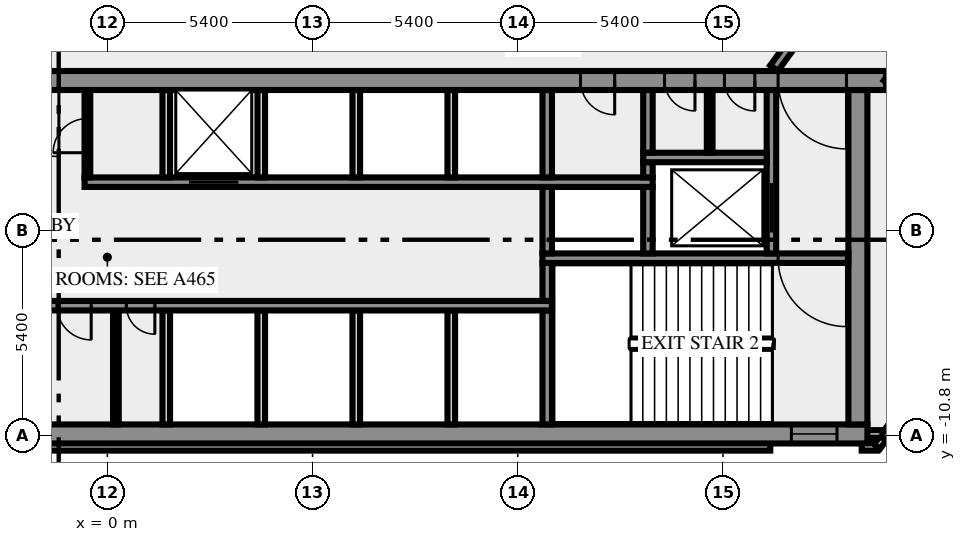
"""IFC4 building model, lengths in metres.
Left out: names, types, materials, properties, quantities, classifications, styles, units other than length and angle.
Written with IfcOpenShell. Run it as: python <this file> out.ifc"""

import sys

from ifc_helpers import new_model, si_unit, direction, frame, frame_2d, origin, place, context, subcontext, project, spatial, rectangle, extrude, element, fill, save


model = new_model("IFC4")
c1 = context("Model", 3, precision=1e-05, world=origin(), true_north=direction((0.0, 1.0)))
c2 = subcontext(c1, "Body", "Model", "MODEL_VIEW")
j1 = project(units=[si_unit("LENGTHUNIT", "METRE"), si_unit("PLANEANGLEUNIT", "RADIAN")], contexts=[c1])
p1 = place(None, origin())
s1 = spatial("IfcSite", under=j1, at=p1, CompositionType="ELEMENT")
p2 = place(p1, origin())
s2 = spatial("IfcBuilding", under=s1, at=p2, CompositionType="ELEMENT")
p3 = place(p2, frame((0.0, 0.0, 89.0)))
s3 = spatial("IfcBuildingStorey", under=s2, at=p3, CompositionType="ELEMENT", Elevation=89.0)
p4 = place(p3, frame((-17.444, -11.088, 0.0), z_axis=(0.0, 0.0, 1.0), x_axis=(1.0, 0.0, 0.0)))
e1 = element("IfcWall", 1, at=p4, inside=s3, PredefinedType="SOLIDWALL", context=c2, shape_type="SweptSolid", body=[
    extrude(rectangle(XDim=34.888, YDim=0.2, at=frame_2d((17.444, 0.0))), origin(), (0.0, 0.0, 1.0), 3.65),
])
p5 = place(p3, frame((19.85, -11.088, 0.0), z_axis=(0.0, 0.0, 1.0), x_axis=(1.0, 0.0, 0.0)))
e2 = element("IfcWall", 2, at=p5, inside=s3, PredefinedType="SOLIDWALL", context=c2, shape_type="SweptSolid", body=[
    extrude(rectangle(XDim=0.406, YDim=0.2, at=frame_2d((0.203, 0.0))), origin(), (0.0, 0.0, 1.0), 3.65),
])
p6 = place(p3, frame((20.253, -11.083, 0.0), z_axis=(0.0, 0.0, 1.0), x_axis=(0.587766567315, 0.809030569476, 0.0)))
e3 = element("IfcWall", 3, at=p6, inside=s3, PredefinedType="SOLIDWALL", context=c2, shape_type="SweptSolid", body=[
    extrude(rectangle(XDim=2.688, YDim=0.2, at=frame_2d((1.344, 0.0))), origin(), (0.0, 0.0, 1.0), 3.65),
])
p7 = place(p3, frame((19.98, -10.75, 0.0), z_axis=(0.0, 0.0, 1.0), x_axis=(1.0, 0.0, 0.0)))
e4 = element("IfcWall", 4, at=p7, inside=s3, PredefinedType="SOLIDWALL", context=c2, shape_type="SweptSolid", body=[
    extrude(rectangle(XDim=0.417, YDim=0.2, at=frame_2d((0.208, 0.0))), origin(), (0.0, 0.0, 1.0), 3.65),
])
p8 = place(p3, frame((-20.0, -10.75, 0.0), z_axis=(0.0, 0.0, 1.0), x_axis=(1.0, 0.0, 0.0)))
e5 = element("IfcWall", 5, at=p8, inside=s3, PredefinedType="SHEAR", context=c2, shape_type="SweptSolid", body=[
    extrude(rectangle(XDim=40.0, YDim=0.5, at=frame_2d((20.0, 0.0))), origin(), (0.0, 0.0, 1.0), 3.65),
])
p9 = place(p8, frame((0.8, 0.0, 1.0)))
e6 = element("IfcOpeningElement", 6, at=p9, cuts=e5, PredefinedType="OPENING", context=c2, shape_type="SweptSolid", body=[
    extrude(rectangle(XDim=1.2, YDim=1.2, at=frame_2d((0.6, 0.6))), frame((0.0, 0.26, 0.0), z_axis=(0.0, -1.0, 0.0), x_axis=(1.0, 0.0, 0.0)), (0.0, 0.0, 1.0), 0.52),
])
p10 = place(p8, frame((38.0, 0.0, 1.0)))
e7 = element("IfcOpeningElement", 7, at=p10, cuts=e5, PredefinedType="OPENING", context=c2, shape_type="SweptSolid", body=[
    extrude(rectangle(XDim=1.2, YDim=1.2, at=frame_2d((0.6, 0.6))), frame((0.0, 0.26, 0.0), z_axis=(0.0, -1.0, 0.0), x_axis=(1.0, 0.0, 0.0)), (0.0, 0.0, 1.0), 0.52),
])
p11 = place(p3, frame((0.225, -10.5, 0.0), z_axis=(0.0, 0.0, 1.0), x_axis=(0.0, 1.0, 0.0)))
e8 = element("IfcWall", 8, at=p11, inside=s3, PredefinedType="PARTITIONING", context=c2, shape_type="SweptSolid", body=[
    extrude(rectangle(XDim=3.0, YDim=0.15, at=frame_2d((1.5, 0.0))), origin(), (0.0, 0.0, 1.0), 3.65),
])
for number, where, z_axis, x_axis in (
    (9, (1.55, -10.5, 0.0), (0.0, 0.0, 1.0), (0.0, 1.0, 0.0)),
    (10, (4.05, -10.5, 0.0), (0.0, 0.0, 1.0), (0.0, 1.0, 0.0)),
    (11, (6.55, -10.5, 0.0), (0.0, 0.0, 1.0), (0.0, 1.0, 0.0)),
    (12, (9.05, -10.5, 0.0), (0.0, 0.0, 1.0), (0.0, 1.0, 0.0)),
):
    element("IfcWall", number, at=place(p3, frame(where, z_axis=z_axis, x_axis=x_axis)), inside=s3, PredefinedType="SOLIDWALL", context=c2, shape_type="SweptSolid", body=[
        extrude(rectangle(XDim=3.0, YDim=0.2, at=frame_2d((1.5, 0.0))), origin(), (0.0, 0.0, 1.0), 3.65),
    ])
p12 = place(p3, frame((11.575, -10.5, 0.0), z_axis=(0.0, 0.0, 1.0), x_axis=(0.0, 1.0, 0.0)))
e13 = element("IfcWall", 13, at=p12, inside=s3, PredefinedType="SHEAR", context=c2, shape_type="SweptSolid", body=[
    extrude(rectangle(XDim=3.0, YDim=0.25, at=frame_2d((1.5, 0.0))), origin(), (0.0, 0.0, 1.0), 3.65),
])
p13 = place(p3, frame((19.75, -10.5, 0.0), z_axis=(0.0, 0.0, 1.0), x_axis=(0.0, 1.0, 0.0)))
e14 = element("IfcWall", 14, at=p13, inside=s3, PredefinedType="SHEAR", context=c2, shape_type="SweptSolid", body=[
    extrude(rectangle(XDim=8.8, YDim=0.5, at=frame_2d((4.4, 0.0))), origin(), (0.0, 0.0, 1.0), 3.65),
])
p14 = place(p3, frame((11.7, -7.375, 0.0), z_axis=(0.0, 0.0, 1.0), x_axis=(-1.0, 0.0, 0.0)))
e15 = element("IfcWall", 15, at=p14, inside=s3, PredefinedType="SHEAR", context=c2, shape_type="SweptSolid", body=[
    extrude(rectangle(XDim=23.4, YDim=0.25, at=frame_2d((11.7, 0.0))), origin(), (0.0, 0.0, 1.0), 3.65),
])
p15 = place(p14, frame((21.45, 0.0, 0.0)))
e16 = element("IfcOpeningElement", 16, at=p15, cuts=e15, PredefinedType="OPENING", context=c2, shape_type="SweptSolid", body=[
    extrude(rectangle(XDim=1.1, YDim=2.1, at=frame_2d((0.55, 1.05))), frame((0.0, 0.135, 0.0), z_axis=(0.0, -1.0, 0.0), x_axis=(1.0, 0.0, 0.0)), (0.0, 0.0, 1.0), 0.27),
])
p16 = place(p14, frame((18.95, 0.0, 0.0)))
e17 = element("IfcOpeningElement", 17, at=p16, cuts=e15, PredefinedType="OPENING", context=c2, shape_type="SweptSolid", body=[
    extrude(rectangle(XDim=1.1, YDim=2.1, at=frame_2d((0.55, 1.05))), frame((0.0, 0.135, 0.0), z_axis=(0.0, -1.0, 0.0), x_axis=(1.0, 0.0, 0.0)), (0.0, 0.0, 1.0), 0.27),
])
p17 = place(p14, frame((16.45, 0.0, 0.0)))
e18 = element("IfcOpeningElement", 18, at=p17, cuts=e15, PredefinedType="OPENING", context=c2, shape_type="SweptSolid", body=[
    extrude(rectangle(XDim=1.1, YDim=2.1, at=frame_2d((0.55, 1.05))), frame((0.0, 0.135, 0.0), z_axis=(0.0, -1.0, 0.0), x_axis=(1.0, 0.0, 0.0)), (0.0, 0.0, 1.0), 0.27),
])
p18 = place(p14, frame((14.25, 0.0, 0.0)))
e19 = element("IfcOpeningElement", 19, at=p18, cuts=e15, PredefinedType="OPENING", context=c2, shape_type="SweptSolid", body=[
    extrude(rectangle(XDim=0.9, YDim=2.1, at=frame_2d((0.45, 1.05))), frame((0.0, 0.135, 0.0), z_axis=(0.0, -1.0, 0.0), x_axis=(1.0, 0.0, 0.0)), (0.0, 0.0, 1.0), 0.27),
])
p19 = place(p14, frame((12.125, 0.0, 0.0)))
e20 = element("IfcOpeningElement", 20, at=p19, cuts=e15, PredefinedType="OPENING", context=c2, shape_type="SweptSolid", body=[
    extrude(rectangle(XDim=0.9, YDim=2.1, at=frame_2d((0.45, 1.05))), frame((0.0, 0.135, 0.0), z_axis=(0.0, -1.0, 0.0), x_axis=(1.0, 0.0, 0.0)), (0.0, 0.0, 1.0), 0.27),
])
p20 = place(p14, frame((10.45, 0.0, 0.0)))
e21 = element("IfcOpeningElement", 21, at=p20, cuts=e15, PredefinedType="OPENING", context=c2, shape_type="SweptSolid", body=[
    extrude(rectangle(XDim=0.75, YDim=2.1, at=frame_2d((0.375, 1.05))), frame((0.0, 0.135, 0.0), z_axis=(0.0, -1.0, 0.0), x_axis=(1.0, 0.0, 0.0)), (0.0, 0.0, 1.0), 0.27),
])
p21 = place(p3, frame((11.575, -7.25, 0.0), z_axis=(0.0, 0.0, 1.0), x_axis=(0.0, 1.0, 0.0)))
e22 = element("IfcWall", 22, at=p21, inside=s3, PredefinedType="SHEAR", context=c2, shape_type="SweptSolid", body=[
    extrude(rectangle(XDim=1.0, YDim=0.25, at=frame_2d((0.5, 0.0))), origin(), (0.0, 0.0, 1.0), 3.65),
])
p22 = place(p3, frame((19.5, -6.125, 0.0), z_axis=(0.0, 0.0, 1.0), x_axis=(-1.0, 0.0, 0.0)))
e23 = element("IfcWall", 23, at=p22, inside=s3, PredefinedType="SHEAR", context=c2, shape_type="SweptSolid", body=[
    extrude(rectangle(XDim=8.05, YDim=0.25, at=frame_2d((4.025, 0.0))), origin(), (0.0, 0.0, 1.0), 3.65),
])
p23 = place(p22, frame((0.05, 0.0, 0.0)))
e24 = element("IfcOpeningElement", 24, at=p23, cuts=e23, PredefinedType="OPENING", context=c2, shape_type="SweptSolid", body=[
    extrude(rectangle(XDim=1.8, YDim=2.1, at=frame_2d((0.9, 1.05))), frame((0.0, 0.135, 0.0), z_axis=(0.0, -1.0, 0.0), x_axis=(1.0, 0.0, 0.0)), (0.0, 0.0, 1.0), 0.27),
])
for number, where, z_axis, x_axis in (
    (25, (11.575, -6.0, 0.0), (0.0, 0.0, 1.0), (0.0, 1.0, 0.0)),
    (26, (14.225, -6.0, 0.0), (0.0, 0.0, 1.0), (0.0, 1.0, 0.0)),
):
    element("IfcWall", number, at=place(p3, frame(where, z_axis=z_axis, x_axis=x_axis)), inside=s3, PredefinedType="SHEAR", context=c2, shape_type="SweptSolid", body=[
        extrude(rectangle(XDim=1.75, YDim=0.25, at=frame_2d((0.875, 0.0))), origin(), (0.0, 0.0, 1.0), 3.65),
    ])
p24 = place(p3, frame((17.475, -6.0, 0.0), z_axis=(0.0, 0.0, 1.0), x_axis=(0.0, 1.0, 0.0)))
e27 = element("IfcWall", 27, at=p24, inside=s3, PredefinedType="SHEAR", context=c2, shape_type="SweptSolid", body=[
    extrude(rectangle(XDim=4.3, YDim=0.25, at=frame_2d((2.15, 0.0))), origin(), (0.0, 0.0, 1.0), 3.65),
])
p25 = place(p24, frame((0.55, 0.0, 0.0)))
e28 = element("IfcOpeningElement", 28, at=p25, cuts=e27, PredefinedType="OPENING", context=c2, shape_type="SweptSolid", body=[
    extrude(rectangle(XDim=1.3, YDim=2.1, at=frame_2d((0.65, 1.05))), frame((0.0, 0.135, 0.0), z_axis=(0.0, -1.0, 0.0), x_axis=(1.0, 0.0, 0.0)), (0.0, 0.0, 1.0), 0.27),
])
p26 = place(p3, frame((-0.6, -4.125, 0.0), z_axis=(0.0, 0.0, 1.0), x_axis=(1.0, 0.0, 0.0)))
e29 = element("IfcWall", 29, at=p26, inside=s3, PredefinedType="SHEAR", context=c2, shape_type="SweptSolid", body=[
    extrude(rectangle(XDim=14.95, YDim=0.25, at=frame_2d((7.475, 0.0))), origin(), (0.0, 0.0, 1.0), 3.65),
])
p27 = place(p26, frame((2.75, 0.0, 0.0)))
e30 = element("IfcOpeningElement", 30, at=p27, cuts=e29, PredefinedType="OPENING", context=c2, shape_type="SweptSolid", body=[
    extrude(rectangle(XDim=1.3, YDim=2.1, at=frame_2d((0.65, 1.05))), frame((0.0, 0.135, 0.0), z_axis=(0.0, -1.0, 0.0), x_axis=(1.0, 0.0, 0.0)), (0.0, 0.0, 1.0), 0.27),
])
p28 = place(p3, frame((-0.525, -4.0, 0.0), z_axis=(0.0, 0.0, 1.0), x_axis=(0.0, 1.0, 0.0)))
e31 = element("IfcWall", 31, at=p28, inside=s3, PredefinedType="PARTITIONING", context=c2, shape_type="SweptSolid", body=[
    extrude(rectangle(XDim=2.3, YDim=0.15, at=frame_2d((1.15, 0.0))), origin(), (0.0, 0.0, 1.0), 3.65),
])
p29 = place(p28, frame((0.65, 0.0, 0.0)))
e32 = element("IfcOpeningElement", 32, at=p29, cuts=e31, PredefinedType="OPENING", context=c2, shape_type="SweptSolid", body=[
    extrude(rectangle(XDim=0.9, YDim=2.1, at=frame_2d((0.45, 1.05))), frame((0.0, 0.085, 0.0), z_axis=(0.0, -1.0, 0.0), x_axis=(1.0, 0.0, 0.0)), (0.0, 0.0, 1.0), 0.17),
])
for number, where, z_axis, x_axis in (
    (33, (1.55, -4.0, 0.0), (0.0, 0.0, 1.0), (0.0, 1.0, 0.0)),
    (34, (4.05, -4.0, 0.0), (0.0, 0.0, 1.0), (0.0, 1.0, 0.0)),
    (35, (6.55, -4.0, 0.0), (0.0, 0.0, 1.0), (0.0, 1.0, 0.0)),
    (36, (9.05, -4.0, 0.0), (0.0, 0.0, 1.0), (0.0, 1.0, 0.0)),
):
    element("IfcWall", number, at=place(p3, frame(where, z_axis=z_axis, x_axis=x_axis)), inside=s3, PredefinedType="SOLIDWALL", context=c2, shape_type="SweptSolid", body=[
        extrude(rectangle(XDim=2.3, YDim=0.2, at=frame_2d((1.15, 0.0))), origin(), (0.0, 0.0, 1.0), 3.65),
    ])
p30 = place(p3, frame((11.575, -4.0, 0.0), z_axis=(0.0, 0.0, 1.0), x_axis=(0.0, 1.0, 0.0)))
e37 = element("IfcWall", 37, at=p30, inside=s3, PredefinedType="SHEAR", context=c2, shape_type="SweptSolid", body=[
    extrude(rectangle(XDim=2.3, YDim=0.25, at=frame_2d((1.15, 0.0))), origin(), (0.0, 0.0, 1.0), 3.65),
])
p31 = place(p3, frame((14.225, -4.0, 0.0), z_axis=(0.0, 0.0, 1.0), x_axis=(0.0, 1.0, 0.0)))
e38 = element("IfcWall", 38, at=p31, inside=s3, PredefinedType="SHEAR", context=c2, shape_type="SweptSolid", body=[
    extrude(rectangle(XDim=0.4, YDim=0.25, at=frame_2d((0.2, 0.0))), origin(), (0.0, 0.0, 1.0), 3.65),
])
p32 = place(p3, frame((14.1, -3.475, 0.0), z_axis=(0.0, 0.0, 1.0), x_axis=(1.0, 0.0, 0.0)))
e39 = element("IfcWall", 39, at=p32, inside=s3, PredefinedType="SHEAR", context=c2, shape_type="SweptSolid", body=[
    extrude(rectangle(XDim=3.25, YDim=0.25, at=frame_2d((1.625, 0.0))), origin(), (0.0, 0.0, 1.0), 3.65),
])
p33 = place(p3, frame((14.225, -3.35, 0.0), z_axis=(0.0, 0.0, 1.0), x_axis=(0.0, 1.0, 0.0)))
e40 = element("IfcWall", 40, at=p33, inside=s3, PredefinedType="SHEAR", context=c2, shape_type="SweptSolid", body=[
    extrude(rectangle(XDim=1.65, YDim=0.25, at=frame_2d((0.825, 0.0))), origin(), (0.0, 0.0, 1.0), 3.65),
])
p34 = place(p3, frame((15.85, -3.35, 0.0), z_axis=(0.0, 0.0, 1.0), x_axis=(0.0, 1.0, 0.0)))
e41 = element("IfcWall", 41, at=p34, inside=s3, PredefinedType="PARTITIONING", context=c2, shape_type="SweptSolid", body=[
    extrude(rectangle(XDim=1.65, YDim=0.15, at=frame_2d((0.825, 0.0))), origin(), (0.0, 0.0, 1.0), 3.65),
])
p35 = place(p3, frame((20.49, -1.45, 0.0), z_axis=(0.0, 0.0, 1.0), x_axis=(-1.0, 0.0, 0.0)))
e42 = element("IfcWall", 42, at=p35, inside=s3, PredefinedType="SHEAR", context=c2, shape_type="SweptSolid", body=[
    extrude(rectangle(XDim=40.98, YDim=0.5, at=frame_2d((20.49, 0.0))), origin(), (0.0, 0.0, 1.0), 3.65),
])
p36 = place(p35, frame((38.14, 0.0, 0.0)))
e43 = element("IfcOpeningElement", 43, at=p36, cuts=e42, PredefinedType="OPENING", context=c2, shape_type="SweptSolid", body=[
    extrude(rectangle(XDim=1.8, YDim=2.1, at=frame_2d((0.9, 1.05))), frame((0.0, 0.26, 0.0), z_axis=(0.0, -1.0, 0.0), x_axis=(1.0, 0.0, 0.0)), (0.0, 0.0, 1.0), 0.52),
])
p37 = place(p35, frame((35.89, 0.0, 0.0)))
e44 = element("IfcOpeningElement", 44, at=p37, cuts=e42, PredefinedType="OPENING", context=c2, shape_type="SweptSolid", body=[
    extrude(rectangle(XDim=0.9, YDim=2.1, at=frame_2d((0.45, 1.05))), frame((0.0, 0.26, 0.0), z_axis=(0.0, -1.0, 0.0), x_axis=(1.0, 0.0, 0.0)), (0.0, 0.0, 1.0), 0.52),
])
p38 = place(p35, frame((32.94, 0.0, 0.0)))
e45 = element("IfcOpeningElement", 45, at=p38, cuts=e42, PredefinedType="OPENING", context=c2, shape_type="SweptSolid", body=[
    extrude(rectangle(XDim=0.9, YDim=2.1, at=frame_2d((0.45, 1.05))), frame((0.0, 0.26, 0.0), z_axis=(0.0, -1.0, 0.0), x_axis=(1.0, 0.0, 0.0)), (0.0, 0.0, 1.0), 0.52),
])
p39 = place(p35, frame((21.765, 0.0, 0.0)))
e46 = element("IfcOpeningElement", 46, at=p39, cuts=e42, PredefinedType="OPENING", context=c2, shape_type="SweptSolid", body=[
    extrude(rectangle(XDim=2.0, YDim=2.1, at=frame_2d((1.0, 1.05))), frame((0.0, 0.26, 0.0), z_axis=(0.0, -1.0, 0.0), x_axis=(1.0, 0.0, 0.0)), (0.0, 0.0, 1.0), 0.52),
])
p40 = place(p35, frame((7.14, 0.0, 0.0)))
e47 = element("IfcOpeningElement", 47, at=p40, cuts=e42, PredefinedType="OPENING", context=c2, shape_type="SweptSolid", body=[
    extrude(rectangle(XDim=0.9, YDim=2.1, at=frame_2d((0.45, 1.05))), frame((0.0, 0.26, 0.0), z_axis=(0.0, -1.0, 0.0), x_axis=(1.0, 0.0, 0.0)), (0.0, 0.0, 1.0), 0.52),
])
p41 = place(p35, frame((5.028, 0.0, 0.0)))
e48 = element("IfcOpeningElement", 48, at=p41, cuts=e42, PredefinedType="OPENING", context=c2, shape_type="SweptSolid", body=[
    extrude(rectangle(XDim=0.8, YDim=2.1, at=frame_2d((0.4, 1.05))), frame((0.0, 0.26, 0.0), z_axis=(0.0, -1.0, 0.0), x_axis=(1.0, 0.0, 0.0)), (0.0, 0.0, 1.0), 0.52),
])
p42 = place(p35, frame((3.452, 0.0, 0.0)))
e49 = element("IfcOpeningElement", 49, at=p42, cuts=e42, PredefinedType="OPENING", context=c2, shape_type="SweptSolid", body=[
    extrude(rectangle(XDim=0.8, YDim=2.1, at=frame_2d((0.4, 1.05))), frame((0.0, 0.26, 0.0), z_axis=(0.0, -1.0, 0.0), x_axis=(1.0, 0.0, 0.0)), (0.0, 0.0, 1.0), 0.52),
])
p43 = place(p35, frame((1.04, 0.0, 0.0)))
e50 = element("IfcOpeningElement", 50, at=p43, cuts=e42, PredefinedType="OPENING", context=c2, shape_type="SweptSolid", body=[
    extrude(rectangle(XDim=1.8, YDim=2.1, at=frame_2d((0.9, 1.05))), frame((0.0, 0.26, 0.0), z_axis=(0.0, -1.0, 0.0), x_axis=(1.0, 0.0, 0.0)), (0.0, 0.0, 1.0), 0.52),
])
p44 = place(p3, frame((17.545, -1.125, 0.0), z_axis=(0.0, 0.0, 1.0), x_axis=(0.587786330937, 0.809016210693, 0.0)))
e51 = element("IfcWall", 51, at=p44, inside=s3, PredefinedType="SOLIDWALL", context=c2, shape_type="SweptSolid", body=[
    extrude(rectangle(XDim=30.103, YDim=0.25, at=frame_2d((15.052, 0.0))), origin(), (0.0, 0.0, 1.0), 3.65),
])
p45 = place(p44, frame((28.679, 0.0, 0.0)))
e52 = element("IfcOpeningElement", 52, at=p45, cuts=e51, PredefinedType="OPENING", context=c2, shape_type="SweptSolid", body=[
    extrude(rectangle(XDim=1.0, YDim=2.1, at=frame_2d((0.5, 1.05))), frame((0.0, 0.135, 0.0), z_axis=(0.0, -1.0, 0.0), x_axis=(1.0, 0.0, 0.0)), (0.0, 0.0, 1.0), 0.27),
])
p46 = place(p44, frame((3.391, 0.0, 0.0)))
e53 = element("IfcOpeningElement", 53, at=p46, cuts=e51, PredefinedType="OPENING", context=c2, shape_type="SweptSolid", body=[
    extrude(rectangle(XDim=1.0, YDim=2.1, at=frame_2d((0.5, 1.05))), frame((0.0, 0.135, 0.0), z_axis=(0.0, -1.0, 0.0), x_axis=(1.0, 0.0, 0.0)), (0.0, 0.0, 1.0), 0.27),
])
p47 = place(p3, frame((37.236, 21.469, 0.0), z_axis=(0.0, 0.0, 1.0), x_axis=(-0.58778344073, -0.809018310549, 0.0)))
e54 = element("IfcWall", 54, at=p47, inside=s3, PredefinedType="SOLIDWALL", context=c2, shape_type="SweptSolid", body=[
    extrude(rectangle(XDim=28.42, YDim=0.25, at=frame_2d((14.21, 0.0))), origin(), (0.0, 0.0, 1.0), 3.65),
])
p48 = place(p47, frame((26.137, 0.0, 0.0)))
e55 = element("IfcOpeningElement", 55, at=p48, cuts=e54, PredefinedType="OPENING", context=c2, shape_type="SweptSolid", body=[
    extrude(rectangle(XDim=1.8, YDim=2.1, at=frame_2d((0.9, 1.05))), frame((0.0, 0.135, 0.0), z_axis=(0.0, -1.0, 0.0), x_axis=(1.0, 0.0, 0.0)), (0.0, 0.0, 1.0), 0.27),
])
p49 = place(p47, frame((0.175, 0.0, 0.0)))
e56 = element("IfcOpeningElement", 56, at=p49, cuts=e54, PredefinedType="OPENING", context=c2, shape_type="SweptSolid", body=[
    extrude(rectangle(XDim=1.8, YDim=2.1, at=frame_2d((0.9, 1.05))), frame((0.0, 0.135, 0.0), z_axis=(0.0, -1.0, 0.0), x_axis=(1.0, 0.0, 0.0)), (0.0, 0.0, 1.0), 0.27),
])
p50 = place(p10, origin())
e57 = element("IfcWindow", 57, at=p50, inside=s3, PartitioningType="SINGLE_PANEL", PredefinedType="WINDOW", context=c2, shape_type="SweptSolid", body=[
    extrude(rectangle(XDim=1.2, YDim=1.2, at=frame_2d((0.6, 0.6))), frame((0.0, 0.03, 0.0), z_axis=(0.0, -1.0, 0.0), x_axis=(1.0, 0.0, 0.0)), (0.0, 0.0, 1.0), 0.06),
])
fill(e7, e57)
p51 = place(p19, origin())
e58 = element("IfcDoor", 58, at=p51, inside=s3, OperationType="SINGLE_SWING_RIGHT", PredefinedType="DOOR", context=c2, shape_type="SweptSolid", body=[
    extrude(rectangle(XDim=0.9, YDim=2.1, at=frame_2d((0.45, 1.05))), frame((0.0, 0.025, 0.0), z_axis=(0.0, -1.0, 0.0), x_axis=(1.0, 0.0, 0.0)), (0.0, 0.0, 1.0), 0.05),
])
fill(e20, e58)
p52 = place(p20, origin())
e59 = element("IfcDoor", 59, at=p52, inside=s3, OperationType="SINGLE_SWING_LEFT", PredefinedType="DOOR", context=c2, shape_type="SweptSolid", body=[
    extrude(rectangle(XDim=0.75, YDim=2.1, at=frame_2d((0.375, 1.05))), frame((0.0, 0.025, 0.0), z_axis=(0.0, -1.0, 0.0), x_axis=(1.0, 0.0, 0.0)), (0.0, 0.0, 1.0), 0.05),
])
fill(e21, e59)
p53 = place(p23, origin())
e60 = element("IfcDoor", 60, at=p53, inside=s3, OperationType="DOUBLE_DOOR_SINGLE_SWING", PredefinedType="DOOR", context=c2, shape_type="SweptSolid", body=[
    extrude(rectangle(XDim=1.8, YDim=2.1, at=frame_2d((0.9, 1.05))), frame((0.0, 0.025, 0.0), z_axis=(0.0, -1.0, 0.0), x_axis=(1.0, 0.0, 0.0)), (0.0, 0.0, 1.0), 0.05),
])
fill(e24, e60)
p54 = place(p25, origin())
e61 = element("IfcDoor", 61, at=p54, inside=s3, OperationType="DOUBLE_DOOR_SLIDING", PredefinedType="DOOR", context=c2, shape_type="SweptSolid", body=[
    extrude(rectangle(XDim=1.3, YDim=2.1, at=frame_2d((0.65, 1.05))), frame((0.0, 0.025, 0.0), z_axis=(0.0, -1.0, 0.0), x_axis=(1.0, 0.0, 0.0)), (0.0, 0.0, 1.0), 0.05),
])
fill(e28, e61)
p55 = place(p27, origin())
e62 = element("IfcDoor", 62, at=p55, inside=s3, OperationType="DOUBLE_DOOR_SLIDING", PredefinedType="DOOR", context=c2, shape_type="SweptSolid", body=[
    extrude(rectangle(XDim=1.3, YDim=2.1, at=frame_2d((0.65, 1.05))), frame((0.0, 0.025, 0.0), z_axis=(0.0, -1.0, 0.0), x_axis=(1.0, 0.0, 0.0)), (0.0, 0.0, 1.0), 0.05),
])
fill(e30, e62)
p56 = place(p29, origin())
e63 = element("IfcDoor", 63, at=p56, inside=s3, OperationType="SINGLE_SWING_LEFT", PredefinedType="DOOR", context=c2, shape_type="SweptSolid", body=[
    extrude(rectangle(XDim=0.9, YDim=2.1, at=frame_2d((0.45, 1.05))), frame((0.0, 0.025, 0.0), z_axis=(0.0, -1.0, 0.0), x_axis=(1.0, 0.0, 0.0)), (0.0, 0.0, 1.0), 0.05),
])
fill(e32, e63)
p57 = place(p39, origin())
e64 = element("IfcDoor", 64, at=p57, inside=s3, OperationType="DOUBLE_DOOR_SINGLE_SWING", PredefinedType="DOOR", context=c2, shape_type="SweptSolid", body=[
    extrude(rectangle(XDim=2.0, YDim=2.1, at=frame_2d((1.0, 1.05))), frame((0.0, 0.025, 0.0), z_axis=(0.0, -1.0, 0.0), x_axis=(1.0, 0.0, 0.0)), (0.0, 0.0, 1.0), 0.05),
])
fill(e46, e64)
p58 = place(p40, origin())
e65 = element("IfcDoor", 65, at=p58, inside=s3, OperationType="SINGLE_SWING_LEFT", PredefinedType="DOOR", context=c2, shape_type="SweptSolid", body=[
    extrude(rectangle(XDim=0.9, YDim=2.1, at=frame_2d((0.45, 1.05))), frame((0.0, 0.025, 0.0), z_axis=(0.0, -1.0, 0.0), x_axis=(1.0, 0.0, 0.0)), (0.0, 0.0, 1.0), 0.05),
])
fill(e47, e65)
p59 = place(p41, origin())
e66 = element("IfcDoor", 66, at=p59, inside=s3, OperationType="SINGLE_SWING_LEFT", PredefinedType="DOOR", context=c2, shape_type="SweptSolid", body=[
    extrude(rectangle(XDim=0.8, YDim=2.1, at=frame_2d((0.4, 1.05))), frame((0.0, 0.025, 0.0), z_axis=(0.0, -1.0, 0.0), x_axis=(1.0, 0.0, 0.0)), (0.0, 0.0, 1.0), 0.05),
])
fill(e48, e66)
p60 = place(p42, origin())
e67 = element("IfcDoor", 67, at=p60, inside=s3, OperationType="SINGLE_SWING_LEFT", PredefinedType="DOOR", context=c2, shape_type="SweptSolid", body=[
    extrude(rectangle(XDim=0.8, YDim=2.1, at=frame_2d((0.4, 1.05))), frame((0.0, 0.025, 0.0), z_axis=(0.0, -1.0, 0.0), x_axis=(1.0, 0.0, 0.0)), (0.0, 0.0, 1.0), 0.05),
])
fill(e49, e67)
p61 = place(p43, origin())
e68 = element("IfcDoor", 68, at=p61, inside=s3, OperationType="DOUBLE_DOOR_SINGLE_SWING", PredefinedType="DOOR", context=c2, shape_type="SweptSolid", body=[
    extrude(rectangle(XDim=1.8, YDim=2.1, at=frame_2d((0.9, 1.05))), frame((0.0, 0.025, 0.0), z_axis=(0.0, -1.0, 0.0), x_axis=(1.0, 0.0, 0.0)), (0.0, 0.0, 1.0), 0.05),
])
fill(e50, e68)
save(model, sys.argv[1])
